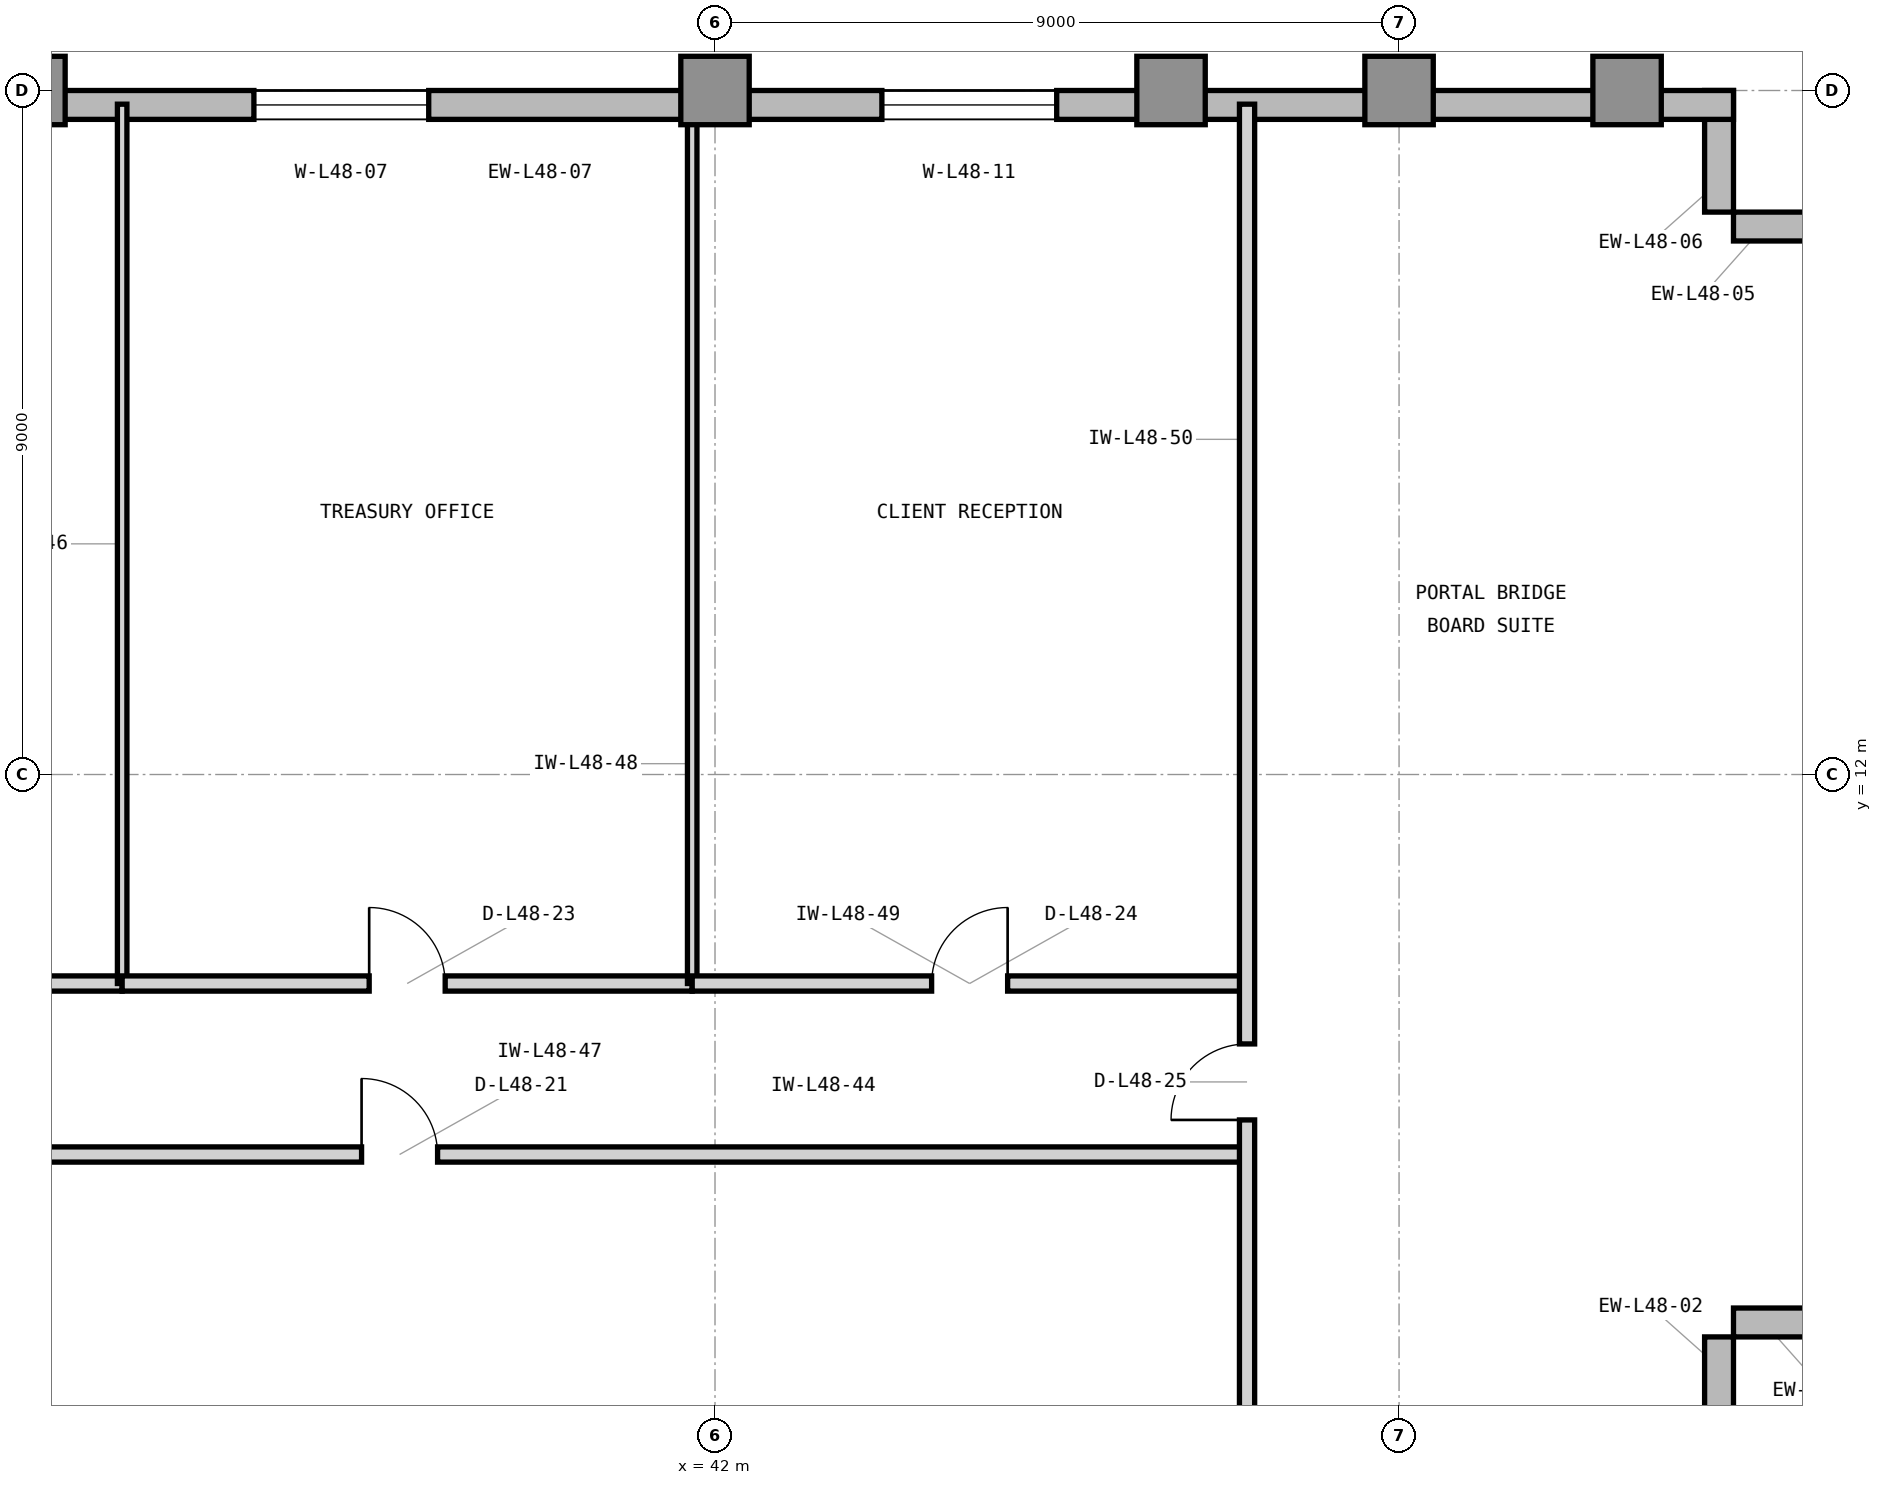
"""IFC4 building model, lengths in metres.
Left out: names, types, materials, properties, quantities, classifications, styles, units other than length and angle.
Written with IfcOpenShell. Run it as: python <this file> out.ifc"""

import sys

from ifc_helpers import new_model, si_unit, direction, frame, frame_2d, origin, origin_2d, place, context, subcontext, project, spatial, rectangle, extrude, element, fill, save


model = new_model("IFC4")
c1 = context("Model", 3, precision=1e-05, world=origin(), true_north=direction((0.0, 1.0)))
c2 = subcontext(c1, "Body", "Model", "MODEL_VIEW")
j1 = project(units=[si_unit("LENGTHUNIT", "METRE"), si_unit("PLANEANGLEUNIT", "RADIAN")], contexts=[c1])
p1 = place(None, origin())
s1 = spatial("IfcSite", under=j1, at=p1, CompositionType="ELEMENT")
p2 = place(p1, origin())
s2 = spatial("IfcBuilding", under=s1, at=p2, CompositionType="ELEMENT")
p3 = place(p2, frame((0.0, 0.0, 199.5)))
s3 = spatial("IfcBuildingStorey", under=s2, at=p3, CompositionType="ELEMENT", Elevation=199.5)
for number, where, z_axis, x_axis in (
    (1, (33.0, 21.0, 0.0), (0.0, 0.0, 1.0), (1.0, 0.0, 0.0)),
    (2, (42.0, 21.0, 0.0), (0.0, 0.0, 1.0), (1.0, 0.0, 0.0)),
    (3, (48.0, 21.0, 0.0), (0.0, 0.0, 1.0), (1.0, 0.0, 0.0)),
    (4, (51.0, 21.0, 0.0), (0.0, 0.0, 1.0), (1.0, 0.0, 0.0)),
    (5, (54.0, 21.0, 0.0), (0.0, 0.0, 1.0), (1.0, 0.0, 0.0)),
):
    element("IfcColumn", number, at=place(p3, frame(where, z_axis=z_axis, x_axis=x_axis)), inside=s3, PredefinedType="COLUMN", context=c2, shape_type="SweptSolid", body=[
        extrude(rectangle(XDim=0.9, YDim=0.9, at=origin_2d()), origin(), (0.0, 0.0, 1.0), 3.9),
    ])
for number, where, z_axis, x_axis in (
    (6, (55.21, 3.0, 0.0), (0.0, 0.0, 1.0), (0.0, 1.0, 0.0)),
    (7, (55.4, 4.79, 0.0), (0.0, 0.0, 1.0), (1.0, 0.0, 0.0)),
    (8, (57.0, 19.21, 0.0), (0.0, 0.0, 1.0), (-1.0, 0.0, 0.0)),
    (9, (55.21, 19.4, 0.0), (0.0, 0.0, 1.0), (0.0, 1.0, 0.0)),
):
    element("IfcWall", number, at=place(p3, frame(where, z_axis=z_axis, x_axis=x_axis)), inside=s3, PredefinedType="STANDARD", context=c2, shape_type="SweptSolid", body=[
        extrude(rectangle(XDim=1.6, YDim=0.38, at=frame_2d((0.8, 0.0))), origin(), (0.0, 0.0, 1.0), 3.7),
    ])
p4 = place(p3, frame((55.4, 20.81, 0.0), z_axis=(0.0, 0.0, 1.0), x_axis=(-1.0, 0.0, 0.0)))
e10 = element("IfcWall", 10, at=p4, inside=s3, PredefinedType="STANDARD", context=c2, shape_type="SweptSolid", body=[
    extrude(rectangle(XDim=31.4, YDim=0.38, at=frame_2d((15.7, 0.0))), origin(), (0.0, 0.0, 1.0), 3.7),
])
p5 = place(p4, frame((17.167, 0.0, 0.9)))
e11 = element("IfcOpeningElement", 11, at=p5, cuts=e10, PredefinedType="OPENING", context=c2, shape_type="SweptSolid", body=[
    extrude(rectangle(XDim=2.3, YDim=2.2, at=frame_2d((1.15, 1.1))), frame((0.0, 0.2, 0.0), z_axis=(0.0, -1.0, 0.0), x_axis=(1.0, 0.0, 0.0)), (0.0, 0.0, 1.0), 0.4),
])
p6 = place(p4, frame((29.034, 0.0, 0.9)))
e12 = element("IfcOpeningElement", 12, at=p6, cuts=e10, PredefinedType="OPENING", context=c2, shape_type="SweptSolid", body=[
    extrude(rectangle(XDim=1.6, YDim=2.2, at=frame_2d((0.8, 1.1))), frame((0.0, 0.2, 0.0), z_axis=(0.0, -1.0, 0.0), x_axis=(1.0, 0.0, 0.0)), (0.0, 0.0, 1.0), 0.4),
])
p7 = place(p4, frame((8.904, 0.0, 0.9)))
e13 = element("IfcOpeningElement", 13, at=p7, cuts=e10, PredefinedType="OPENING", context=c2, shape_type="SweptSolid", body=[
    extrude(rectangle(XDim=2.3, YDim=2.2, at=frame_2d((1.15, 1.1))), frame((0.0, 0.2, 0.0), z_axis=(0.0, -1.0, 0.0), x_axis=(1.0, 0.0, 0.0)), (0.0, 0.0, 1.0), 0.4),
])
p8 = place(p3, frame((26.7, 7.0, 0.0), z_axis=(0.0, 0.0, 1.0), x_axis=(1.0, 0.0, 0.0)))
e14 = element("IfcWall", 14, at=p8, inside=s3, PredefinedType="PARTITIONING", context=c2, shape_type="SweptSolid", body=[
    extrude(rectangle(XDim=22.3, YDim=0.2, at=frame_2d((11.15, 0.0))), origin(), (0.0, 0.0, 1.0), 3.69),
])
p9 = place(p8, frame((10.65, 0.0, 0.0)))
e15 = element("IfcOpeningElement", 15, at=p9, cuts=e14, PredefinedType="OPENING", context=c2, shape_type="SweptSolid", body=[
    extrude(rectangle(XDim=1.0, YDim=2.15, at=frame_2d((0.5, 1.075))), frame((0.0, 0.11, 0.0), z_axis=(0.0, -1.0, 0.0), x_axis=(1.0, 0.0, 0.0)), (0.0, 0.0, 1.0), 0.22),
])
p10 = place(p3, frame((26.7, 9.25, 0.0), z_axis=(0.0, 0.0, 1.0), x_axis=(1.0, 0.0, 0.0)))
e16 = element("IfcWall", 16, at=p10, inside=s3, PredefinedType="PARTITIONING", context=c2, shape_type="SweptSolid", body=[
    extrude(rectangle(XDim=7.5, YDim=0.2, at=frame_2d((3.75, 0.0))), origin(), (0.0, 0.0, 1.0), 3.69),
])
p11 = place(p10, frame((3.25, 0.0, 0.0)))
e17 = element("IfcOpeningElement", 17, at=p11, cuts=e16, PredefinedType="OPENING", context=c2, shape_type="SweptSolid", body=[
    extrude(rectangle(XDim=1.0, YDim=2.15, at=frame_2d((0.5, 1.075))), frame((0.0, 0.11, 0.0), z_axis=(0.0, -1.0, 0.0), x_axis=(1.0, 0.0, 0.0)), (0.0, 0.0, 1.0), 0.22),
])
p12 = place(p3, frame((34.2, 9.25, 0.0), z_axis=(0.0, 0.0, 1.0), x_axis=(0.0, 1.0, 0.0)))
e18 = element("IfcWall", 18, at=p12, inside=s3, PredefinedType="PARTITIONING", context=c2, shape_type="SweptSolid", body=[
    extrude(rectangle(XDim=11.57, YDim=0.125, at=frame_2d((5.785, 0.0))), origin(), (0.0, 0.0, 1.0), 3.69),
])
p13 = place(p3, frame((34.2, 9.25, 0.0), z_axis=(0.0, 0.0, 1.0), x_axis=(1.0, 0.0, 0.0)))
e19 = element("IfcWall", 19, at=p13, inside=s3, PredefinedType="PARTITIONING", context=c2, shape_type="SweptSolid", body=[
    extrude(rectangle(XDim=7.5, YDim=0.2, at=frame_2d((3.75, 0.0))), origin(), (0.0, 0.0, 1.0), 3.69),
])
p14 = place(p13, frame((3.25, 0.0, 0.0)))
e20 = element("IfcOpeningElement", 20, at=p14, cuts=e19, PredefinedType="OPENING", context=c2, shape_type="SweptSolid", body=[
    extrude(rectangle(XDim=1.0, YDim=2.15, at=frame_2d((0.5, 1.075))), frame((0.0, 0.11, 0.0), z_axis=(0.0, -1.0, 0.0), x_axis=(1.0, 0.0, 0.0)), (0.0, 0.0, 1.0), 0.22),
])
p15 = place(p3, frame((41.7, 9.25, 0.0), z_axis=(0.0, 0.0, 1.0), x_axis=(0.0, 1.0, 0.0)))
e21 = element("IfcWall", 21, at=p15, inside=s3, PredefinedType="PARTITIONING", context=c2, shape_type="SweptSolid", body=[
    extrude(rectangle(XDim=11.57, YDim=0.125, at=frame_2d((5.785, 0.0))), origin(), (0.0, 0.0, 1.0), 3.69),
])
p16 = place(p3, frame((41.7, 9.25, 0.0), z_axis=(0.0, 0.0, 1.0), x_axis=(1.0, 0.0, 0.0)))
e22 = element("IfcWall", 22, at=p16, inside=s3, PredefinedType="PARTITIONING", context=c2, shape_type="SweptSolid", body=[
    extrude(rectangle(XDim=7.3, YDim=0.2, at=frame_2d((3.65, 0.0))), origin(), (0.0, 0.0, 1.0), 3.69),
])
p17 = place(p16, frame((3.15, 0.0, 0.0)))
e23 = element("IfcOpeningElement", 23, at=p17, cuts=e22, PredefinedType="OPENING", context=c2, shape_type="SweptSolid", body=[
    extrude(rectangle(XDim=1.0, YDim=2.15, at=frame_2d((0.5, 1.075))), frame((0.0, 0.11, 0.0), z_axis=(0.0, -1.0, 0.0), x_axis=(1.0, 0.0, 0.0)), (0.0, 0.0, 1.0), 0.22),
])
p18 = place(p3, frame((49.0, 3.18, 0.0), z_axis=(0.0, 0.0, 1.0), x_axis=(0.0, 1.0, 0.0)))
e24 = element("IfcWall", 24, at=p18, inside=s3, PredefinedType="PARTITIONING", context=c2, shape_type="SweptSolid", body=[
    extrude(rectangle(XDim=17.64, YDim=0.2, at=frame_2d((8.82, 0.0))), origin(), (0.0, 0.0, 1.0), 3.69),
])
p19 = place(p18, frame((4.275, 0.0, 0.0)))
e25 = element("IfcOpeningElement", 25, at=p19, cuts=e24, PredefinedType="OPENING", context=c2, shape_type="SweptSolid", body=[
    extrude(rectangle(XDim=1.0, YDim=2.15, at=frame_2d((0.5, 1.075))), frame((0.0, 0.11, 0.0), z_axis=(0.0, -1.0, 0.0), x_axis=(1.0, 0.0, 0.0)), (0.0, 0.0, 1.0), 0.22),
])
p20 = place(p5, origin())
e26 = element("IfcWindow", 26, at=p20, inside=s3, PartitioningType="SINGLE_PANEL", PredefinedType="WINDOW", context=c2, shape_type="SweptSolid", body=[
    extrude(rectangle(XDim=2.3, YDim=2.2, at=frame_2d((1.15, 1.1))), frame((0.0, 0.11, 0.0), z_axis=(0.0, -1.0, 0.0), x_axis=(1.0, 0.0, 0.0)), (0.0, 0.0, 1.0), 0.06),
])
fill(e11, e26)
p21 = place(p9, origin())
e27 = element("IfcDoor", 27, at=p21, inside=s3, OperationType="SINGLE_SWING_LEFT", PredefinedType="DOOR", context=c2, shape_type="SweptSolid", body=[
    extrude(rectangle(XDim=1.0, YDim=2.15, at=frame_2d((0.5, 1.075))), frame((0.0, 0.025, 0.0), z_axis=(0.0, -1.0, 0.0), x_axis=(1.0, 0.0, 0.0)), (0.0, 0.0, 1.0), 0.05),
])
fill(e15, e27)
p22 = place(p14, origin())
e28 = element("IfcDoor", 28, at=p22, inside=s3, OperationType="SINGLE_SWING_LEFT", PredefinedType="DOOR", context=c2, shape_type="SweptSolid", body=[
    extrude(rectangle(XDim=1.0, YDim=2.15, at=frame_2d((0.5, 1.075))), frame((0.0, 0.025, 0.0), z_axis=(0.0, -1.0, 0.0), x_axis=(1.0, 0.0, 0.0)), (0.0, 0.0, 1.0), 0.05),
])
fill(e20, e28)
p23 = place(p17, origin())
e29 = element("IfcDoor", 29, at=p23, inside=s3, OperationType="SINGLE_SWING_RIGHT", PredefinedType="DOOR", context=c2, shape_type="SweptSolid", body=[
    extrude(rectangle(XDim=1.0, YDim=2.15, at=frame_2d((0.5, 1.075))), frame((0.0, 0.025, 0.0), z_axis=(0.0, -1.0, 0.0), x_axis=(1.0, 0.0, 0.0)), (0.0, 0.0, 1.0), 0.05),
])
fill(e23, e29)
p24 = place(p19, origin())
e30 = element("IfcDoor", 30, at=p24, inside=s3, OperationType="SINGLE_SWING_LEFT", PredefinedType="DOOR", context=c2, shape_type="SweptSolid", body=[
    extrude(rectangle(XDim=1.0, YDim=2.15, at=frame_2d((0.5, 1.075))), frame((0.0, 0.025, 0.0), z_axis=(0.0, -1.0, 0.0), x_axis=(1.0, 0.0, 0.0)), (0.0, 0.0, 1.0), 0.05),
])
fill(e25, e30)
p25 = place(p7, origin())
e31 = element("IfcWindow", 31, at=p25, inside=s3, PartitioningType="SINGLE_PANEL", PredefinedType="WINDOW", context=c2, shape_type="SweptSolid", body=[
    extrude(rectangle(XDim=2.3, YDim=2.2, at=frame_2d((1.15, 1.1))), frame((0.0, 0.11, 0.0), z_axis=(0.0, -1.0, 0.0), x_axis=(1.0, 0.0, 0.0)), (0.0, 0.0, 1.0), 0.06),
])
fill(e13, e31)
save(model, sys.argv[1])
